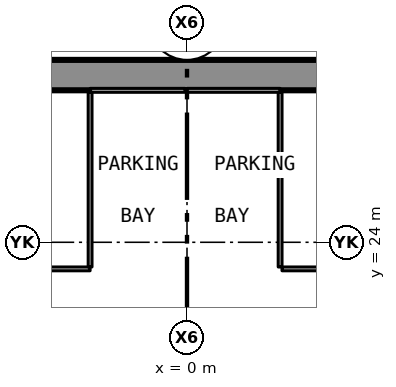
"""IFC4 building model, lengths in metres.
Left out: names, types, materials, properties, quantities, classifications, styles, units other than length and angle.
Written with IfcOpenShell. Run it as: python <this file> out.ifc"""

import sys

from ifc_helpers import new_model, si_unit, direction, frame, frame_2d, origin, place, context, subcontext, project, spatial, rectangle, extrude, element, save


model = new_model("IFC4")
c1 = context("Model", 3, precision=1e-05, world=origin(), true_north=direction((0.0, 1.0)))
c2 = subcontext(c1, "Body", "Model", "MODEL_VIEW")
j1 = project(units=[si_unit("LENGTHUNIT", "METRE"), si_unit("PLANEANGLEUNIT", "RADIAN")], contexts=[c1])
p1 = place(None, origin())
s1 = spatial("IfcSite", under=j1, at=p1, CompositionType="ELEMENT")
p2 = place(p1, origin())
s2 = spatial("IfcBuilding", under=s1, at=p2, CompositionType="ELEMENT")
p3 = place(p2, frame((0.0, 0.0, -10.0)))
s3 = spatial("IfcBuildingStorey", under=s2, at=p3, CompositionType="ELEMENT", Elevation=-10.0)
p4 = place(p3, frame((-37.6, 28.4, -0.6), z_axis=(0.0, 0.0, 1.0), x_axis=(1.0, 0.0, 0.0)))
e1 = element("IfcWall", 1, at=p4, inside=s3, PredefinedType="SOLIDWALL", context=c2, shape_type="SweptSolid", body=[
    extrude(rectangle(XDim=75.2, YDim=0.8, at=frame_2d((37.6, 0.0))), origin(), (0.0, 0.0, 1.0), 5.3),
])
p5 = place(p3, frame((-7.55, 23.3, 0.0), z_axis=(0.0, 0.0, 1.0), x_axis=(1.0, 0.0, 0.0)))
e2 = element("IfcWall", 2, at=p5, inside=s3, PredefinedType="PARTITIONING", context=c2, shape_type="SweptSolid", body=[
    extrude(rectangle(XDim=5.0, YDim=0.1, at=frame_2d((2.5, 0.0))), origin(), (0.0, 0.0, 1.0), 4.7),
])
p6 = place(p3, frame((2.5, 23.3, 0.0), z_axis=(0.0, 0.0, 1.0), x_axis=(1.0, 0.0, 0.0)))
e3 = element("IfcWall", 3, at=p6, inside=s3, PredefinedType="PARTITIONING", context=c2, shape_type="SweptSolid", body=[
    extrude(rectangle(XDim=4.95, YDim=0.1, at=frame_2d((2.475, 0.0))), origin(), (0.0, 0.0, 1.0), 4.7),
])
p7 = place(p3, frame((-2.55, 28.0, 0.0), z_axis=(0.0, 0.0, 1.0), x_axis=(1.0, 0.0, 0.0)))
e4 = element("IfcWall", 4, at=p7, inside=s3, PredefinedType="PARTITIONING", context=c2, shape_type="SweptSolid", body=[
    extrude(rectangle(XDim=2.5, YDim=0.1, at=frame_2d((1.25, 0.0))), origin(), (0.0, 0.0, 1.0), 4.078),
])
p8 = place(p3, frame((0.0, 28.0, 0.0), z_axis=(0.0, 0.0, 1.0), x_axis=(1.0, 0.0, 0.0)))
e5 = element("IfcWall", 5, at=p8, inside=s3, PredefinedType="PARTITIONING", context=c2, shape_type="SweptSolid", body=[
    extrude(rectangle(XDim=2.45, YDim=0.1, at=frame_2d((1.225, 0.0))), origin(), (0.0, 0.0, 1.0), 4.078),
])
for number, where, z_axis, x_axis in (
    (6, (-2.55, 23.35, 0.0), (0.0, 0.0, 1.0), (0.0, 1.0, 0.0)),
    (7, (2.45, 23.35, 0.0), (0.0, 0.0, 1.0), (0.0, 1.0, 0.0)),
):
    element("IfcWall", number, at=place(p3, frame(where, z_axis=z_axis, x_axis=x_axis)), inside=s3, PredefinedType="PARTITIONING", context=c2, shape_type="SweptSolid", body=[
        extrude(rectangle(XDim=4.6, YDim=0.1, at=frame_2d((2.3, 0.0))), origin(), (0.0, 0.0, 1.0), 4.7),
    ])
save(model, sys.argv[1])
